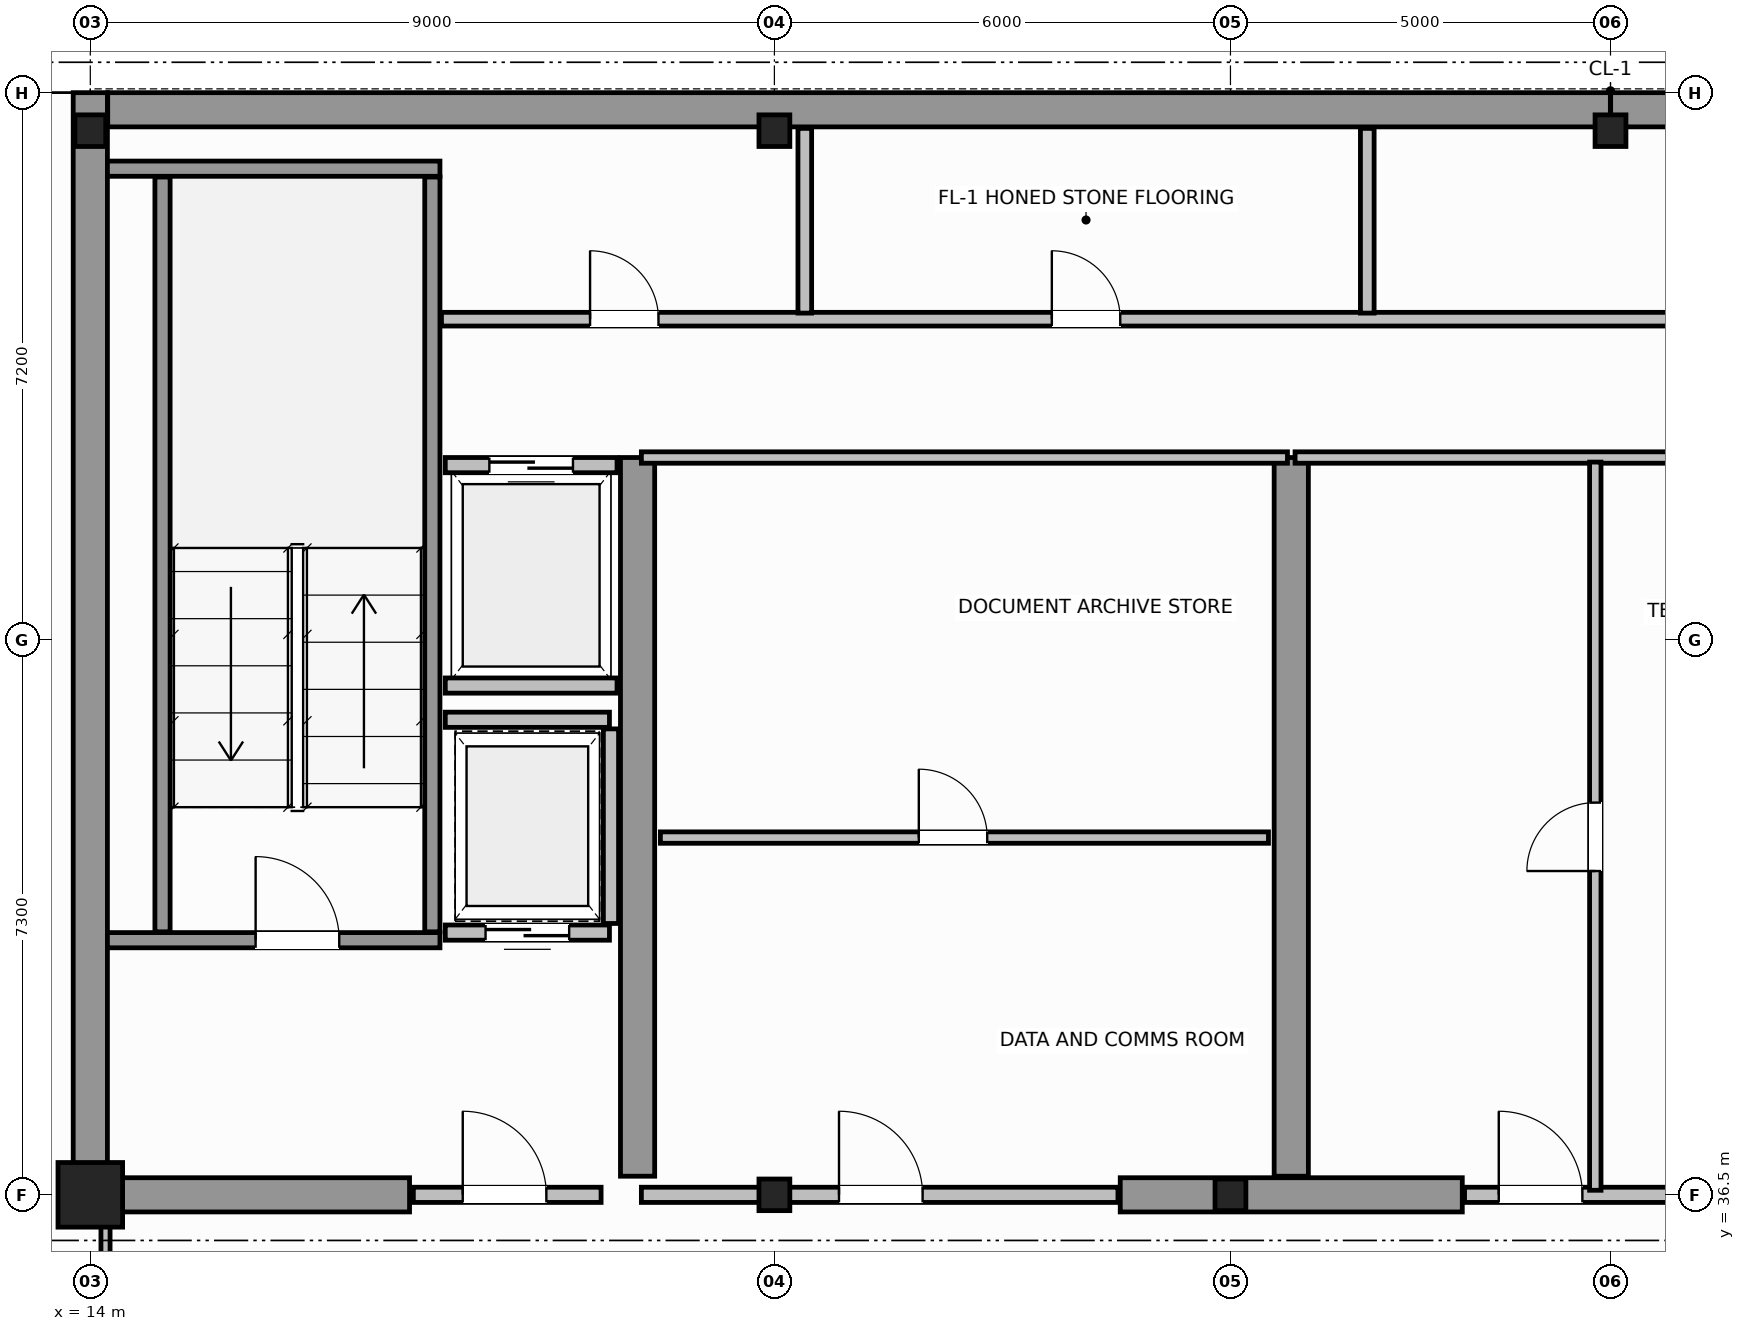
"""IFC4 building model, lengths in metres.
Left out: names, types, materials, properties, quantities, classifications, styles, units other than length and angle.
Written with IfcOpenShell. Run it as: python <this file> out.ifc"""

import sys

from ifc_helpers import new_model, si_unit, direction, frame, frame_2d, origin, origin_2d, place, context, subcontext, project, spatial, rectangle, i_section, extrude, source, transform, mapped, element, fill, save


model = new_model("IFC4")
c1 = context("Model", 3, precision=1e-05, world=origin(), true_north=direction((0.0, 1.0)))
c2 = subcontext(c1, "Body", "Model", "MODEL_VIEW")
j1 = project(units=[si_unit("LENGTHUNIT", "METRE"), si_unit("PLANEANGLEUNIT", "RADIAN")], contexts=[c1])
p1 = place(None, origin())
s1 = spatial("IfcSite", under=j1, at=p1, CompositionType="ELEMENT")
p2 = place(p1, origin())
s2 = spatial("IfcBuilding", under=s1, at=p2, CompositionType="ELEMENT")
p3 = place(p2, frame((0.0, 0.0, 284.0)))
s3 = spatial("IfcBuildingStorey", under=s2, at=p3, CompositionType="ELEMENT", Elevation=284.0)
m1 = source(origin(), c2, "Body", "SweptSolid", [
    extrude(rectangle(XDim=0.85, YDim=0.85, at=origin_2d()), origin(), (0.0, 0.0, 1.0), 3.8),
])
p4 = place(p3, frame((14.0, 36.5, 0.0), z_axis=(0.0, 0.0, 1.0), x_axis=(1.0, 0.0, 0.0)))
e1 = element("IfcColumn", 1, at=p4, inside=s3, PredefinedType="COLUMN", context=c2, shape_type="MappedRepresentation", body=[
    mapped(m1, transform((0.0, 0.0, 0.0), scale=1.0)),
])
m2 = source(origin(), c2, "Body", "SweptSolid", [
    extrude(i_section(OverallWidth=0.406, OverallDepth=0.416, WebThickness=0.03, FlangeThickness=0.042, FilletRadius=0.015, at=origin_2d()), origin(), (0.0, 0.0, 1.0), 3.8),
])
for number, where, z_axis, x_axis in (
    (2, (23.0, 36.5, 0.0), (0.0, 0.0, 1.0), (1.0, 0.0, 0.0)),
    (3, (29.0, 36.5, 0.0), (0.0, 0.0, 1.0), (1.0, 0.0, 0.0)),
    (4, (14.0, 50.5, 0.0), (0.0, 0.0, 1.0), (1.0, 0.0, 0.0)),
    (5, (23.0, 50.5, 0.0), (0.0, 0.0, 1.0), (1.0, 0.0, 0.0)),
    (6, (34.0, 50.5, 0.0), (0.0, 0.0, 1.0), (1.0, 0.0, 0.0)),
):
    element("IfcColumn", number, at=place(p3, frame(where, z_axis=z_axis, x_axis=x_axis)), inside=s3, PredefinedType="COLUMN", context=c2, shape_type="MappedRepresentation", body=[
        mapped(m2, transform((0.0, 0.0, 0.0), scale=1.0)),
    ])
for number, where, z_axis, x_axis in (
    (7, (14.229, 50.775, 0.0), (0.0, 0.0, 1.0), (1.0, 0.0, 0.0)),
    (8, (34.002, 50.775, 0.0), (0.0, 0.0, 1.0), (1.0, 0.0, 0.0)),
):
    element("IfcWall", number, at=place(p3, frame(where, z_axis=z_axis, x_axis=x_axis)), inside=s3, PredefinedType="SHEAR", context=c2, shape_type="SweptSolid", body=[
        extrude(rectangle(XDim=19.769, YDim=0.45, at=frame_2d((9.885, 0.0))), origin(), (0.0, 0.0, 1.0), 3.8),
    ])
p5 = place(p3, frame((14.0, 36.5, 0.0), z_axis=(0.0, 0.0, 1.0), x_axis=(0.0, 1.0, 0.0)))
e9 = element("IfcWall", 9, at=p5, inside=s3, PredefinedType="SHEAR", context=c2, shape_type="SweptSolid", body=[
    extrude(rectangle(XDim=14.5, YDim=0.45, at=frame_2d((7.25, 0.0))), origin(), (0.0, 0.0, 1.0), 3.8),
])
p6 = place(p3, frame((14.245, 36.5, 0.0), z_axis=(0.0, 0.0, 1.0), x_axis=(1.0, 0.0, 0.0)))
e10 = element("IfcWall", 10, at=p6, inside=s3, PredefinedType="SHEAR", context=c2, shape_type="SweptSolid", body=[
    extrude(rectangle(XDim=3.955, YDim=0.45, at=frame_2d((1.978, 0.0))), origin(), (0.0, 0.0, 1.0), 2.58),
])
p7 = place(p3, frame((27.55, 36.5, 0.0), z_axis=(0.0, 0.0, 1.0), x_axis=(1.0, 0.0, 0.0)))
e11 = element("IfcWall", 11, at=p7, inside=s3, PredefinedType="SHEAR", context=c2, shape_type="SweptSolid", body=[
    extrude(rectangle(XDim=4.5, YDim=0.45, at=frame_2d((2.25, 0.0))), origin(), (0.0, 0.0, 1.0), 3.8),
])
for number, where, z_axis, x_axis in (
    (12, (21.2, 36.745, 0.0), (0.0, 0.0, 1.0), (0.0, 1.0, 0.0)),
    (13, (29.8, 36.745, 0.0), (0.0, 0.0, 1.0), (0.0, 1.0, 0.0)),
):
    element("IfcWall", number, at=place(p3, frame(where, z_axis=z_axis, x_axis=x_axis)), inside=s3, PredefinedType="SHEAR", context=c2, shape_type="SweptSolid", body=[
        extrude(rectangle(XDim=9.455, YDim=0.45, at=frame_2d((4.728, 0.0))), origin(), (0.0, 0.0, 1.0), 3.8),
    ])
p8 = place(p3, frame((14.225, 39.85, 0.0), z_axis=(0.0, 0.0, 1.0), x_axis=(1.0, 0.0, 0.0)))
e14 = element("IfcWall", 14, at=p8, inside=s3, PredefinedType="SOLIDWALL", context=c2, shape_type="SweptSolid", body=[
    extrude(rectangle(XDim=4.375, YDim=0.2, at=frame_2d((2.188, 0.0))), origin(), (0.0, 0.0, 1.0), 3.8),
])
p9 = place(p8, frame((1.95, 0.0, 0.0)))
e15 = element("IfcOpeningElement", 15, at=p9, cuts=e14, PredefinedType="OPENING", context=c2, shape_type="SweptSolid", body=[
    extrude(rectangle(XDim=1.1, YDim=2.15, at=frame_2d((0.55, 1.075))), frame((0.0, 0.11, 0.0), z_axis=(0.0, -1.0, 0.0), x_axis=(1.0, 0.0, 0.0)), (0.0, 0.0, 1.0), 0.22),
])
p10 = place(p3, frame((14.225, 50.0, 0.0), z_axis=(0.0, 0.0, 1.0), x_axis=(1.0, 0.0, 0.0)))
e16 = element("IfcWall", 16, at=p10, inside=s3, PredefinedType="SOLIDWALL", context=c2, shape_type="SweptSolid", body=[
    extrude(rectangle(XDim=4.375, YDim=0.2, at=frame_2d((2.188, 0.0))), origin(), (0.0, 0.0, 1.0), 3.8),
])
for number, where, z_axis, x_axis in (
    (17, (14.95, 39.96, 0.0), (0.0, 0.0, 1.0), (0.0, 1.0, 0.0)),
    (18, (18.5, 39.96, 0.0), (0.0, 0.0, 1.0), (0.0, 1.0, 0.0)),
):
    element("IfcWall", number, at=place(p3, frame(where, z_axis=z_axis, x_axis=x_axis)), inside=s3, PredefinedType="SOLIDWALL", context=c2, shape_type="SweptSolid", body=[
        extrude(rectangle(XDim=9.93, YDim=0.2, at=frame_2d((4.965, 0.0))), origin(), (0.0, 0.0, 1.0), 3.8),
    ])
p11 = place(p3, frame((18.25, 36.5, 0.0), z_axis=(0.0, 0.0, 1.0), x_axis=(1.0, 0.0, 0.0)))
e19 = element("IfcWall", 19, at=p11, inside=s3, PredefinedType="SOLIDWALL", context=c2, shape_type="SweptSolid", body=[
    extrude(rectangle(XDim=2.47, YDim=0.2, at=frame_2d((1.235, 0.0))), origin(), (0.0, 0.0, 1.0), 2.57),
])
p12 = place(p11, frame((0.65, 0.0, 0.0)))
e20 = element("IfcOpeningElement", 20, at=p12, cuts=e19, PredefinedType="OPENING", context=c2, shape_type="SweptSolid", body=[
    extrude(rectangle(XDim=1.1, YDim=2.15, at=frame_2d((0.55, 1.075))), frame((0.0, 0.11, 0.0), z_axis=(0.0, -1.0, 0.0), x_axis=(1.0, 0.0, 0.0)), (0.0, 0.0, 1.0), 0.22),
])
p13 = place(p3, frame((18.67, 46.1, 0.0), z_axis=(0.0, 0.0, 1.0), x_axis=(1.0, 0.0, 0.0)))
e21 = element("IfcWall", 21, at=p13, inside=s3, PredefinedType="SOLIDWALL", context=c2, shape_type="SweptSolid", body=[
    extrude(rectangle(XDim=2.26, YDim=0.2, at=frame_2d((1.13, 0.0))), origin(), (0.0, 0.0, 1.0), 3.58),
])
p14 = place(p13, frame((0.58, 0.0, 0.0)))
e22 = element("IfcOpeningElement", 22, at=p14, cuts=e21, PredefinedType="OPENING", context=c2, shape_type="SweptSolid", body=[
    extrude(rectangle(XDim=1.1, YDim=2.15, at=frame_2d((0.55, 1.075))), frame((0.0, 0.11, 0.0), z_axis=(0.0, -1.0, 0.0), x_axis=(1.0, 0.0, 0.0)), (0.0, 0.0, 1.0), 0.22),
])
p15 = place(p3, frame((18.67, 43.2, 0.0), z_axis=(0.0, 0.0, 1.0), x_axis=(1.0, 0.0, 0.0)))
e23 = element("IfcWall", 23, at=p15, inside=s3, PredefinedType="SOLIDWALL", context=c2, shape_type="SweptSolid", body=[
    extrude(rectangle(XDim=2.26, YDim=0.2, at=frame_2d((1.13, 0.0))), origin(), (0.0, 0.0, 1.0), 3.58),
])
p16 = place(p3, frame((18.67, 39.95, 0.0), z_axis=(0.0, 0.0, 1.0), x_axis=(1.0, 0.0, 0.0)))
e24 = element("IfcWall", 24, at=p16, inside=s3, PredefinedType="SOLIDWALL", context=c2, shape_type="SweptSolid", body=[
    extrude(rectangle(XDim=2.16, YDim=0.2, at=frame_2d((1.08, 0.0))), origin(), (0.0, 0.0, 1.0), 3.58),
])
p17 = place(p16, frame((0.53, 0.0, 0.0)))
e25 = element("IfcOpeningElement", 25, at=p17, cuts=e24, PredefinedType="OPENING", context=c2, shape_type="SweptSolid", body=[
    extrude(rectangle(XDim=1.1, YDim=2.15, at=frame_2d((0.55, 1.075))), frame((0.0, 0.11, 0.0), z_axis=(0.0, -1.0, 0.0), x_axis=(1.0, 0.0, 0.0)), (0.0, 0.0, 1.0), 0.22),
])
p18 = place(p3, frame((18.67, 42.75, 0.0), z_axis=(0.0, 0.0, 1.0), x_axis=(1.0, 0.0, 0.0)))
e26 = element("IfcWall", 26, at=p18, inside=s3, PredefinedType="SOLIDWALL", context=c2, shape_type="SweptSolid", body=[
    extrude(rectangle(XDim=2.16, YDim=0.2, at=frame_2d((1.08, 0.0))), origin(), (0.0, 0.0, 1.0), 3.58),
])
p19 = place(p3, frame((20.85, 40.07, 0.0), z_axis=(0.0, 0.0, 1.0), x_axis=(0.0, 1.0, 0.0)))
e27 = element("IfcWall", 27, at=p19, inside=s3, PredefinedType="SOLIDWALL", context=c2, shape_type="SweptSolid", body=[
    extrude(rectangle(XDim=2.56, YDim=0.2, at=frame_2d((1.28, 0.0))), origin(), (0.0, 0.0, 1.0), 3.58),
])
p20 = place(p3, frame((21.25, 36.5, 0.0), z_axis=(0.0, 0.0, 1.0), x_axis=(1.0, 0.0, 0.0)))
e28 = element("IfcWall", 28, at=p20, inside=s3, PredefinedType="SOLIDWALL", context=c2, shape_type="SweptSolid", body=[
    extrude(rectangle(XDim=6.27, YDim=0.2, at=frame_2d((3.135, 0.0))), origin(), (0.0, 0.0, 1.0), 2.57),
])
p21 = place(p20, frame((2.6, 0.0, 0.0)))
e29 = element("IfcOpeningElement", 29, at=p21, cuts=e28, PredefinedType="OPENING", context=c2, shape_type="SweptSolid", body=[
    extrude(rectangle(XDim=1.1, YDim=2.15, at=frame_2d((0.55, 1.075))), frame((0.0, 0.11, 0.0), z_axis=(0.0, -1.0, 0.0), x_axis=(1.0, 0.0, 0.0)), (0.0, 0.0, 1.0), 0.22),
])
p22 = place(p3, frame((21.25, 46.2, 0.0), z_axis=(0.0, 0.0, 1.0), x_axis=(1.0, 0.0, 0.0)))
e30 = element("IfcWall", 30, at=p22, inside=s3, PredefinedType="PARTITIONING", context=c2, shape_type="SweptSolid", body=[
    extrude(rectangle(XDim=8.5, YDim=0.15, at=frame_2d((4.25, 0.0))), origin(), (0.0, 0.0, 1.0), 3.58),
])
p23 = place(p3, frame((21.5, 41.2, 0.0), z_axis=(0.0, 0.0, 1.0), x_axis=(1.0, 0.0, 0.0)))
e31 = element("IfcWall", 31, at=p23, inside=s3, PredefinedType="PARTITIONING", context=c2, shape_type="SweptSolid", body=[
    extrude(rectangle(XDim=8.0, YDim=0.15, at=frame_2d((4.0, 0.0))), origin(), (0.0, 0.0, 1.0), 3.58),
])
p24 = place(p23, frame((3.4, 0.0, 0.0)))
e32 = element("IfcOpeningElement", 32, at=p24, cuts=e31, PredefinedType="OPENING", context=c2, shape_type="SweptSolid", body=[
    extrude(rectangle(XDim=0.9, YDim=2.1, at=frame_2d((0.45, 1.05))), frame((0.0, 0.085, 0.0), z_axis=(0.0, -1.0, 0.0), x_axis=(1.0, 0.0, 0.0)), (0.0, 0.0, 1.0), 0.17),
])
p25 = place(p3, frame((32.08, 36.5, 0.0), z_axis=(0.0, 0.0, 1.0), x_axis=(1.0, 0.0, 0.0)))
e33 = element("IfcWall", 33, at=p25, inside=s3, PredefinedType="SOLIDWALL", context=c2, shape_type="SweptSolid", body=[
    extrude(rectangle(XDim=4.04, YDim=0.2, at=frame_2d((2.02, 0.0))), origin(), (0.0, 0.0, 1.0), 3.12),
])
p26 = place(p25, frame((0.45, 0.0, 0.0)))
e34 = element("IfcOpeningElement", 34, at=p26, cuts=e33, PredefinedType="OPENING", context=c2, shape_type="SweptSolid", body=[
    extrude(rectangle(XDim=1.1, YDim=2.15, at=frame_2d((0.55, 1.075))), frame((0.0, 0.11, 0.0), z_axis=(0.0, -1.0, 0.0), x_axis=(1.0, 0.0, 0.0)), (0.0, 0.0, 1.0), 0.22),
])
p27 = place(p3, frame((29.85, 46.2, 0.0), z_axis=(0.0, 0.0, 1.0), x_axis=(1.0, 0.0, 0.0)))
e35 = element("IfcWall", 35, at=p27, inside=s3, PredefinedType="PARTITIONING", context=c2, shape_type="SweptSolid", body=[
    extrude(rectangle(XDim=8.5, YDim=0.15, at=frame_2d((4.25, 0.0))), origin(), (0.0, 0.0, 1.0), 3.58),
])
p28 = place(p3, frame((33.8, 36.56, 0.0), z_axis=(0.0, 0.0, 1.0), x_axis=(0.0, 1.0, 0.0)))
e36 = element("IfcWall", 36, at=p28, inside=s3, PredefinedType="PARTITIONING", context=c2, shape_type="SweptSolid", body=[
    extrude(rectangle(XDim=9.58, YDim=0.15, at=frame_2d((4.79, 0.0))), origin(), (0.0, 0.0, 1.0), 3.58),
])
p29 = place(p28, frame((4.2, 0.0, 0.0)))
e37 = element("IfcOpeningElement", 37, at=p29, cuts=e36, PredefinedType="OPENING", context=c2, shape_type="SweptSolid", body=[
    extrude(rectangle(XDim=0.9, YDim=2.1, at=frame_2d((0.45, 1.05))), frame((0.0, 0.085, 0.0), z_axis=(0.0, -1.0, 0.0), x_axis=(1.0, 0.0, 0.0)), (0.0, 0.0, 1.0), 0.17),
])
p30 = place(p3, frame((18.62, 48.02, 0.0), z_axis=(0.0, 0.0, 1.0), x_axis=(1.0, 0.0, 0.0)))
e38 = element("IfcWall", 38, at=p30, inside=s3, PredefinedType="PLUMBINGWALL", context=c2, shape_type="SweptSolid", body=[
    extrude(rectangle(XDim=30.76, YDim=0.18, at=frame_2d((15.38, 0.0))), origin(), (0.0, 0.0, 1.0), 3.58),
])
p31 = place(p30, frame((1.955, 0.0, 0.0)))
e39 = element("IfcOpeningElement", 39, at=p31, cuts=e38, PredefinedType="OPENING", context=c2, shape_type="SweptSolid", body=[
    extrude(rectangle(XDim=0.9, YDim=2.15, at=frame_2d((0.45, 1.075))), frame((0.0, 0.1, 0.0), z_axis=(0.0, -1.0, 0.0), x_axis=(1.0, 0.0, 0.0)), (0.0, 0.0, 1.0), 0.2),
])
p32 = place(p30, frame((8.03, 0.0, 0.0)))
e40 = element("IfcOpeningElement", 40, at=p32, cuts=e38, PredefinedType="OPENING", context=c2, shape_type="SweptSolid", body=[
    extrude(rectangle(XDim=0.9, YDim=2.15, at=frame_2d((0.45, 1.075))), frame((0.0, 0.1, 0.0), z_axis=(0.0, -1.0, 0.0), x_axis=(1.0, 0.0, 0.0)), (0.0, 0.0, 1.0), 0.2),
])
p33 = place(p30, frame((16.93, 0.0, 0.0)))
e41 = element("IfcOpeningElement", 41, at=p33, cuts=e38, PredefinedType="OPENING", context=c2, shape_type="SweptSolid", body=[
    extrude(rectangle(XDim=0.9, YDim=2.15, at=frame_2d((0.45, 1.075))), frame((0.0, 0.1, 0.0), z_axis=(0.0, -1.0, 0.0), x_axis=(1.0, 0.0, 0.0)), (0.0, 0.0, 1.0), 0.2),
])
p34 = place(p30, frame((26.205, 0.0, 0.0)))
e42 = element("IfcOpeningElement", 42, at=p34, cuts=e38, PredefinedType="OPENING", context=c2, shape_type="SweptSolid", body=[
    extrude(rectangle(XDim=0.9, YDim=2.15, at=frame_2d((0.45, 1.075))), frame((0.0, 0.1, 0.0), z_axis=(0.0, -1.0, 0.0), x_axis=(1.0, 0.0, 0.0)), (0.0, 0.0, 1.0), 0.2),
])
for number, where, z_axis, x_axis in (
    (43, (23.4, 48.1, 0.0), (0.0, 0.0, 1.0), (0.0, 1.0, 0.0)),
    (44, (30.8, 48.1, 0.0), (0.0, 0.0, 1.0), (0.0, 1.0, 0.0)),
):
    element("IfcWall", number, at=place(p3, frame(where, z_axis=z_axis, x_axis=x_axis)), inside=s3, PredefinedType="PLUMBINGWALL", context=c2, shape_type="SweptSolid", body=[
        extrude(rectangle(XDim=2.43, YDim=0.18, at=frame_2d((1.215, 0.0))), origin(), (0.0, 0.0, 1.0), 3.58),
    ])
p35 = place(p3, frame((14.2, 34.16, 0.0), z_axis=(0.0, 0.0, 1.0), x_axis=(0.0, 1.0, 0.0)))
e45 = element("IfcWall", 45, at=p35, inside=s3, PredefinedType="PARTITIONING", context=c2, shape_type="SweptSolid", body=[
    extrude(rectangle(XDim=2.28, YDim=0.12, at=frame_2d((1.14, 0.0))), origin(), (0.0, 0.0, 1.0), 3.58),
])
p36 = place(p35, frame((0.65, 0.0, 0.0)))
e46 = element("IfcOpeningElement", 46, at=p36, cuts=e45, PredefinedType="OPENING", context=c2, shape_type="SweptSolid", body=[
    extrude(rectangle(XDim=0.9, YDim=2.15, at=frame_2d((0.45, 1.075))), frame((0.0, 0.07, 0.0), z_axis=(0.0, -1.0, 0.0), x_axis=(1.0, 0.0, 0.0)), (0.0, 0.0, 1.0), 0.14),
])
m3 = source(origin(), c2, "Body", "SweptSolid", [
    extrude(rectangle(XDim=1.1, YDim=2.15, at=frame_2d((0.55, 1.075))), frame((0.0, 0.025, 0.0), z_axis=(0.0, -1.0, 0.0), x_axis=(1.0, 0.0, 0.0)), (0.0, 0.0, 1.0), 0.05),
])
p37 = place(p9, origin())
e47 = element("IfcDoor", 47, at=p37, inside=s3, OperationType="SINGLE_SWING_LEFT", PredefinedType="DOOR", context=c2, shape_type="MappedRepresentation", body=[
    mapped(m3, transform((0.0, 0.0, 0.0), scale=1.0)),
])
fill(e15, e47)
p38 = place(p12, origin())
e48 = element("IfcDoor", 48, at=p38, inside=s3, OperationType="SINGLE_SWING_RIGHT", PredefinedType="DOOR", context=c2, shape_type="MappedRepresentation", body=[
    mapped(m3, transform((0.0, 0.0, 0.0), scale=1.0)),
])
fill(e20, e48)
p39 = place(p14, origin())
e49 = element("IfcDoor", 49, at=p39, inside=s3, OperationType="DOUBLE_DOOR_SLIDING", PredefinedType="DOOR", context=c2, shape_type="MappedRepresentation", body=[
    mapped(m3, transform((0.0, 0.0, 0.0), scale=1.0)),
])
fill(e22, e49)
p40 = place(p17, origin())
e50 = element("IfcDoor", 50, at=p40, inside=s3, OperationType="DOUBLE_DOOR_SLIDING", PredefinedType="DOOR", context=c2, shape_type="MappedRepresentation", body=[
    mapped(m3, transform((0.0, 0.0, 0.0), scale=1.0)),
])
fill(e25, e50)
p41 = place(p21, origin())
e51 = element("IfcDoor", 51, at=p41, inside=s3, OperationType="SINGLE_SWING_LEFT", PredefinedType="DOOR", context=c2, shape_type="MappedRepresentation", body=[
    mapped(m3, transform((0.0, 0.0, 0.0), scale=1.0)),
])
fill(e29, e51)
m4 = source(origin(), c2, "Body", "SweptSolid", [
    extrude(rectangle(XDim=0.9, YDim=2.1, at=frame_2d((0.45, 1.05))), frame((0.0, 0.025, 0.0), z_axis=(0.0, -1.0, 0.0), x_axis=(1.0, 0.0, 0.0)), (0.0, 0.0, 1.0), 0.05),
])
p42 = place(p24, origin())
e52 = element("IfcDoor", 52, at=p42, inside=s3, OperationType="SINGLE_SWING_RIGHT", PredefinedType="DOOR", context=c2, shape_type="MappedRepresentation", body=[
    mapped(m4, transform((0.0, 0.0, 0.0), scale=1.0)),
])
fill(e32, e52)
p43 = place(p26, origin())
e53 = element("IfcDoor", 53, at=p43, inside=s3, OperationType="SINGLE_SWING_LEFT", PredefinedType="DOOR", context=c2, shape_type="MappedRepresentation", body=[
    mapped(m3, transform((0.0, 0.0, 0.0), scale=1.0)),
])
fill(e34, e53)
p44 = place(p29, origin())
e54 = element("IfcDoor", 54, at=p44, inside=s3, OperationType="SINGLE_SWING_RIGHT", PredefinedType="DOOR", context=c2, shape_type="MappedRepresentation", body=[
    mapped(m4, transform((0.0, 0.0, 0.0), scale=1.0)),
])
fill(e37, e54)
m5 = source(origin(), c2, "Body", "SweptSolid", [
    extrude(rectangle(XDim=0.9, YDim=2.15, at=frame_2d((0.45, 1.075))), frame((0.0, 0.025, 0.0), z_axis=(0.0, -1.0, 0.0), x_axis=(1.0, 0.0, 0.0)), (0.0, 0.0, 1.0), 0.05),
])
p45 = place(p31, origin())
e55 = element("IfcDoor", 55, at=p45, inside=s3, OperationType="SINGLE_SWING_LEFT", PredefinedType="DOOR", context=c2, shape_type="MappedRepresentation", body=[
    mapped(m5, transform((0.0, 0.0, 0.0), scale=1.0)),
])
fill(e39, e55)
p46 = place(p32, origin())
e56 = element("IfcDoor", 56, at=p46, inside=s3, OperationType="SINGLE_SWING_RIGHT", PredefinedType="DOOR", context=c2, shape_type="MappedRepresentation", body=[
    mapped(m5, transform((0.0, 0.0, 0.0), scale=1.0)),
])
fill(e40, e56)
save(model, sys.argv[1])
